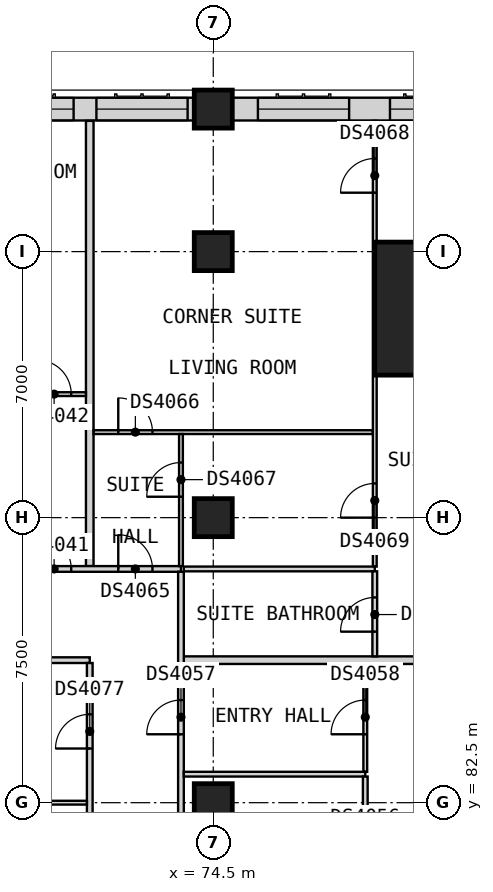
"""IFC4 building model, lengths in metres.
Left out: names, types, materials, properties, quantities, classifications, styles, units other than length and angle.
Written with IfcOpenShell. Run it as: python <this file> out.ifc"""

import sys

from ifc_helpers import new_model, si_unit, direction, frame, frame_2d, origin, origin_2d, place, context, subcontext, project, spatial, rectangle, extrude, element, fill, save


model = new_model("IFC4")
c1 = context("Model", 3, precision=1e-05, world=origin(), true_north=direction((0.0, 1.0)))
c2 = subcontext(c1, "Body", "Model", "MODEL_VIEW")
j1 = project(units=[si_unit("LENGTHUNIT", "METRE"), si_unit("PLANEANGLEUNIT", "RADIAN")], contexts=[c1])
p1 = place(None, origin())
s1 = spatial("IfcSite", under=j1, at=p1, CompositionType="ELEMENT")
p2 = place(p1, origin())
s2 = spatial("IfcBuilding", under=s1, at=p2, CompositionType="ELEMENT")
p3 = place(p2, frame((0.0, 0.0, 141.0)))
s3 = spatial("IfcBuildingStorey", under=s2, at=p3, CompositionType="ELEMENT", Elevation=141.0)
for number, where, z_axis, x_axis in (
    (1, (74.5, 100.75, 0.0), (0.0, 0.0, 1.0), (1.0, 0.0, 0.0)),
    (2, (74.5, 82.5, 0.0), (0.0, 0.0, 1.0), (1.0, 0.0, 0.0)),
    (3, (74.5, 90.0, 0.0), (0.0, 0.0, 1.0), (1.0, 0.0, 0.0)),
    (4, (74.5, 97.0, 0.0), (0.0, 0.0, 1.0), (1.0, 0.0, 0.0)),
):
    element("IfcColumn", number, at=place(p3, frame(where, z_axis=z_axis, x_axis=x_axis)), inside=s3, PredefinedType="COLUMN", context=c2, shape_type="SweptSolid", body=[
        extrude(rectangle(XDim=1.0, YDim=1.0, at=origin_2d()), origin(), (0.0, 0.0, 1.0), 3.6),
    ])
p4 = place(p3, frame((80.5, 95.5, 0.0), z_axis=(0.0, 0.0, 1.0), x_axis=(1.0, 0.0, 0.0)))
e5 = element("IfcColumn", 5, at=p4, inside=s3, PredefinedType="COLUMN", context=c2, shape_type="SweptSolid", body=[
    extrude(rectangle(XDim=3.5, YDim=3.5, at=origin_2d()), origin(), (0.0, 0.0, 1.0), 3.6),
])
p5 = place(p3, frame((82.25, 100.75, 0.0), z_axis=(0.0, 0.0, 1.0), x_axis=(-1.0, 0.0, 0.0)))
e6 = element("IfcWall", 6, at=p5, inside=s3, PredefinedType="SOLIDWALL", context=c2, shape_type="SweptSolid", body=[
    extrude(rectangle(XDim=7.25, YDim=0.6, at=frame_2d((3.625, 0.0))), origin(), (0.0, 0.0, 1.0), 2.85),
])
p6 = place(p5, frame((4.175, 0.0, 0.8)))
e7 = element("IfcOpeningElement", 7, at=p6, cuts=e6, PredefinedType="OPENING", context=c2, shape_type="SweptSolid", body=[
    extrude(rectangle(XDim=2.4, YDim=1.8, at=frame_2d((1.2, 0.9))), frame((0.0, 0.31, 0.0), z_axis=(0.0, -1.0, 0.0), x_axis=(1.0, 0.0, 0.0)), (0.0, 0.0, 1.0), 0.62),
])
p7 = place(p5, frame((1.3, 0.0, 0.8)))
e8 = element("IfcOpeningElement", 8, at=p7, cuts=e6, PredefinedType="OPENING", context=c2, shape_type="SweptSolid", body=[
    extrude(rectangle(XDim=1.8, YDim=1.8, at=frame_2d((0.9, 0.9))), frame((0.0, 0.31, 0.0), z_axis=(0.0, -1.0, 0.0), x_axis=(1.0, 0.0, 0.0)), (0.0, 0.0, 1.0), 0.62),
])
p8 = place(p3, frame((74.0, 100.75, 0.0), z_axis=(0.0, 0.0, 1.0), x_axis=(-1.0, 0.0, 0.0)))
e9 = element("IfcWall", 9, at=p8, inside=s3, PredefinedType="SOLIDWALL", context=c2, shape_type="SweptSolid", body=[
    extrude(rectangle(XDim=6.0, YDim=0.6, at=frame_2d((3.0, 0.0))), origin(), (0.0, 0.0, 1.0), 2.85),
])
p9 = place(p8, frame((3.175, 0.0, 0.8)))
e10 = element("IfcOpeningElement", 10, at=p9, cuts=e9, PredefinedType="OPENING", context=c2, shape_type="SweptSolid", body=[
    extrude(rectangle(XDim=2.4, YDim=1.8, at=frame_2d((1.2, 0.9))), frame((0.0, 0.31, 0.0), z_axis=(0.0, -1.0, 0.0), x_axis=(1.0, 0.0, 0.0)), (0.0, 0.0, 1.0), 0.62),
])
p10 = place(p8, frame((0.175, 0.0, 0.8)))
e11 = element("IfcOpeningElement", 11, at=p10, cuts=e9, PredefinedType="OPENING", context=c2, shape_type="SweptSolid", body=[
    extrude(rectangle(XDim=2.4, YDim=1.8, at=frame_2d((1.2, 0.9))), frame((0.0, 0.31, 0.0), z_axis=(0.0, -1.0, 0.0), x_axis=(1.0, 0.0, 0.0)), (0.0, 0.0, 1.0), 0.62),
])
for number, where, z_axis, x_axis in (
    (12, (73.725, 86.25, 0.0), (0.0, 0.0, 1.0), (1.0, 0.0, 0.0)),
    (13, (71.25, 88.725, 0.0), (0.0, 0.0, 1.0), (0.0, 1.0, 0.0)),
):
    element("IfcWall", number, at=place(p3, frame(where, z_axis=z_axis, x_axis=x_axis)), inside=s3, PredefinedType="PARTITIONING", context=c2, shape_type="SweptSolid", body=[
        extrude(rectangle(XDim=11.715, YDim=0.2, at=frame_2d((5.857, 0.0))), origin(), (0.0, 0.0, 1.0), 3.35),
    ])
p11 = place(p3, frame((33.75, 86.25, 0.0), z_axis=(0.0, 0.0, 1.0), x_axis=(1.0, 0.0, 0.0)))
e14 = element("IfcWall", 14, at=p11, inside=s3, PredefinedType="PARTITIONING", context=c2, shape_type="SweptSolid", body=[
    extrude(rectangle(XDim=37.5, YDim=0.15, at=frame_2d((18.75, 0.0))), origin(), (0.0, 0.0, 1.0), 3.35),
])
p12 = place(p11, frame((12.45, 0.0, 0.0)))
e15 = element("IfcOpeningElement", 15, at=p12, cuts=e14, PredefinedType="OPENING", context=c2, shape_type="SweptSolid", body=[
    extrude(rectangle(XDim=0.9, YDim=2.1, at=frame_2d((0.45, 1.05))), frame((0.0, 0.085, 0.0), z_axis=(0.0, -1.0, 0.0), x_axis=(1.0, 0.0, 0.0)), (0.0, 0.0, 1.0), 0.17),
])
p13 = place(p11, frame((27.225, 0.0, 0.0)))
e16 = element("IfcOpeningElement", 16, at=p13, cuts=e14, PredefinedType="OPENING", context=c2, shape_type="SweptSolid", body=[
    extrude(rectangle(XDim=0.9, YDim=2.1, at=frame_2d((0.45, 1.05))), frame((0.0, 0.085, 0.0), z_axis=(0.0, -1.0, 0.0), x_axis=(1.0, 0.0, 0.0)), (0.0, 0.0, 1.0), 0.17),
])
p14 = place(p3, frame((33.75, 88.65, 0.0), z_axis=(0.0, 0.0, 1.0), x_axis=(1.0, 0.0, 0.0)))
e17 = element("IfcWall", 17, at=p14, inside=s3, PredefinedType="PARTITIONING", context=c2, shape_type="SweptSolid", body=[
    extrude(rectangle(XDim=39.9, YDim=0.15, at=frame_2d((19.95, 0.0))), origin(), (0.0, 0.0, 1.0), 3.35),
])
p15 = place(p14, frame((5.175, 0.0, 0.0)))
e18 = element("IfcOpeningElement", 18, at=p15, cuts=e17, PredefinedType="OPENING", context=c2, shape_type="SweptSolid", body=[
    extrude(rectangle(XDim=0.9, YDim=2.1, at=frame_2d((0.45, 1.05))), frame((0.0, 0.085, 0.0), z_axis=(0.0, -1.0, 0.0), x_axis=(1.0, 0.0, 0.0)), (0.0, 0.0, 1.0), 0.17),
])
p16 = place(p14, frame((9.762, 0.0, 0.0)))
e19 = element("IfcOpeningElement", 19, at=p16, cuts=e17, PredefinedType="OPENING", context=c2, shape_type="SweptSolid", body=[
    extrude(rectangle(XDim=0.9, YDim=2.1, at=frame_2d((0.45, 1.05))), frame((0.0, 0.085, 0.0), z_axis=(0.0, -1.0, 0.0), x_axis=(1.0, 0.0, 0.0)), (0.0, 0.0, 1.0), 0.17),
])
p17 = place(p14, frame((16.938, 0.0, 0.0)))
e20 = element("IfcOpeningElement", 20, at=p17, cuts=e17, PredefinedType="OPENING", context=c2, shape_type="SweptSolid", body=[
    extrude(rectangle(XDim=1.0, YDim=2.1, at=frame_2d((0.5, 1.05))), frame((0.0, 0.085, 0.0), z_axis=(0.0, -1.0, 0.0), x_axis=(1.0, 0.0, 0.0)), (0.0, 0.0, 1.0), 0.17),
])
p18 = place(p14, frame((24.3, 0.0, 0.0)))
e21 = element("IfcOpeningElement", 21, at=p18, cuts=e17, PredefinedType="OPENING", context=c2, shape_type="SweptSolid", body=[
    extrude(rectangle(XDim=0.9, YDim=2.1, at=frame_2d((0.45, 1.05))), frame((0.0, 0.085, 0.0), z_axis=(0.0, -1.0, 0.0), x_axis=(1.0, 0.0, 0.0)), (0.0, 0.0, 1.0), 0.17),
])
p19 = place(p14, frame((36.113, 0.0, 0.0)))
e22 = element("IfcOpeningElement", 22, at=p19, cuts=e17, PredefinedType="OPENING", context=c2, shape_type="SweptSolid", body=[
    extrude(rectangle(XDim=0.9, YDim=2.1, at=frame_2d((0.45, 1.05))), frame((0.0, 0.085, 0.0), z_axis=(0.0, -1.0, 0.0), x_axis=(1.0, 0.0, 0.0)), (0.0, 0.0, 1.0), 0.17),
])
p20 = place(p14, frame((38.25, 0.0, 0.0)))
e23 = element("IfcOpeningElement", 23, at=p20, cuts=e17, PredefinedType="OPENING", context=c2, shape_type="SweptSolid", body=[
    extrude(rectangle(XDim=0.9, YDim=2.1, at=frame_2d((0.45, 1.05))), frame((0.0, 0.085, 0.0), z_axis=(0.0, -1.0, 0.0), x_axis=(1.0, 0.0, 0.0)), (0.0, 0.0, 1.0), 0.17),
])
p21 = place(p3, frame((71.25, 78.075, 0.0), z_axis=(0.0, 0.0, 1.0), x_axis=(0.0, 1.0, 0.0)))
e24 = element("IfcWall", 24, at=p21, inside=s3, PredefinedType="PARTITIONING", context=c2, shape_type="SweptSolid", body=[
    extrude(rectangle(XDim=8.1, YDim=0.15, at=frame_2d((4.05, 0.0))), origin(), (0.0, 0.0, 1.0), 3.35),
])
p22 = place(p21, frame((5.85, 0.0, 0.0)))
e25 = element("IfcOpeningElement", 25, at=p22, cuts=e24, PredefinedType="OPENING", context=c2, shape_type="SweptSolid", body=[
    extrude(rectangle(XDim=0.9, YDim=2.1, at=frame_2d((0.45, 1.05))), frame((0.0, 0.085, 0.0), z_axis=(0.0, -1.0, 0.0), x_axis=(1.0, 0.0, 0.0)), (0.0, 0.0, 1.0), 0.17),
])
p23 = place(p21, frame((1.725, 0.0, 0.0)))
e26 = element("IfcOpeningElement", 26, at=p23, cuts=e24, PredefinedType="OPENING", context=c2, shape_type="SweptSolid", body=[
    extrude(rectangle(XDim=0.9, YDim=2.1, at=frame_2d((0.45, 1.05))), frame((0.0, 0.085, 0.0), z_axis=(0.0, -1.0, 0.0), x_axis=(1.0, 0.0, 0.0)), (0.0, 0.0, 1.0), 0.17),
])
p24 = place(p3, frame((73.65, 50.175, 0.0), z_axis=(0.0, 0.0, 1.0), x_axis=(0.0, 1.0, 0.0)))
e27 = element("IfcWall", 27, at=p24, inside=s3, PredefinedType="PARTITIONING", context=c2, shape_type="SweptSolid", body=[
    extrude(rectangle(XDim=38.4, YDim=0.15, at=frame_2d((19.2, 0.0))), origin(), (0.0, 0.0, 1.0), 3.35),
])
p25 = place(p24, frame((7.875, 0.0, 0.0)))
e28 = element("IfcOpeningElement", 28, at=p25, cuts=e27, PredefinedType="OPENING", context=c2, shape_type="SweptSolid", body=[
    extrude(rectangle(XDim=0.9, YDim=2.1, at=frame_2d((0.45, 1.05))), frame((0.0, 0.085, 0.0), z_axis=(0.0, -1.0, 0.0), x_axis=(1.0, 0.0, 0.0)), (0.0, 0.0, 1.0), 0.17),
])
p26 = place(p24, frame((23.012, 0.0, 0.0)))
e29 = element("IfcOpeningElement", 29, at=p26, cuts=e27, PredefinedType="OPENING", context=c2, shape_type="SweptSolid", body=[
    extrude(rectangle(XDim=1.0, YDim=2.1, at=frame_2d((0.5, 1.05))), frame((0.0, 0.085, 0.0), z_axis=(0.0, -1.0, 0.0), x_axis=(1.0, 0.0, 0.0)), (0.0, 0.0, 1.0), 0.17),
])
p27 = place(p24, frame((27.188, 0.0, 0.0)))
e30 = element("IfcOpeningElement", 30, at=p27, cuts=e27, PredefinedType="OPENING", context=c2, shape_type="SweptSolid", body=[
    extrude(rectangle(XDim=0.9, YDim=2.1, at=frame_2d((0.45, 1.05))), frame((0.0, 0.085, 0.0), z_axis=(0.0, -1.0, 0.0), x_axis=(1.0, 0.0, 0.0)), (0.0, 0.0, 1.0), 0.17),
])
p28 = place(p24, frame((34.125, 0.0, 0.0)))
e31 = element("IfcOpeningElement", 31, at=p28, cuts=e27, PredefinedType="OPENING", context=c2, shape_type="SweptSolid", body=[
    extrude(rectangle(XDim=0.9, YDim=2.1, at=frame_2d((0.45, 1.05))), frame((0.0, 0.085, 0.0), z_axis=(0.0, -1.0, 0.0), x_axis=(1.0, 0.0, 0.0)), (0.0, 0.0, 1.0), 0.17),
])
p29 = place(p3, frame((60.0, 82.5, 0.0), z_axis=(0.0, 0.0, 1.0), x_axis=(1.0, 0.0, 0.0)))
e32 = element("IfcWall", 32, at=p29, inside=s3, PredefinedType="PARTITIONING", context=c2, shape_type="SweptSolid", body=[
    extrude(rectangle(XDim=11.175, YDim=0.1, at=frame_2d((5.587, 0.0))), origin(), (0.0, 0.0, 1.0), 3.35),
])
p30 = place(p3, frame((71.35, 92.25, 0.0), z_axis=(0.0, 0.0, 1.0), x_axis=(1.0, 0.0, 0.0)))
e33 = element("IfcWall", 33, at=p30, inside=s3, PredefinedType="PARTITIONING", context=c2, shape_type="SweptSolid", body=[
    extrude(rectangle(XDim=7.35, YDim=0.1, at=frame_2d((3.675, 0.0))), origin(), (0.0, 0.0, 1.0), 3.35),
])
p31 = place(p30, frame((0.65, 0.0, 0.0)))
e34 = element("IfcOpeningElement", 34, at=p31, cuts=e33, PredefinedType="OPENING", context=c2, shape_type="SweptSolid", body=[
    extrude(rectangle(XDim=0.9, YDim=2.1, at=frame_2d((0.45, 1.05))), frame((0.0, 0.06, 0.0), z_axis=(0.0, -1.0, 0.0), x_axis=(1.0, 0.0, 0.0)), (0.0, 0.0, 1.0), 0.12),
])
p32 = place(p3, frame((69.438, 93.25, 0.0), z_axis=(0.0, 0.0, 1.0), x_axis=(1.0, 0.0, 0.0)))
e35 = element("IfcWall", 35, at=p32, inside=s3, PredefinedType="PARTITIONING", context=c2, shape_type="SweptSolid", body=[
    extrude(rectangle(XDim=1.712, YDim=0.1, at=frame_2d((0.856, 0.0))), origin(), (0.0, 0.0, 1.0), 3.35),
])
p33 = place(p32, frame((0.425, 0.0, 0.0)))
e36 = element("IfcOpeningElement", 36, at=p33, cuts=e35, PredefinedType="OPENING", context=c2, shape_type="SweptSolid", body=[
    extrude(rectangle(XDim=0.9, YDim=2.1, at=frame_2d((0.45, 1.05))), frame((0.0, 0.06, 0.0), z_axis=(0.0, -1.0, 0.0), x_axis=(1.0, 0.0, 0.0)), (0.0, 0.0, 1.0), 0.12),
])
p34 = place(p3, frame((78.8, 96.75, 0.0), z_axis=(0.0, 0.0, 1.0), x_axis=(1.0, 0.0, 0.0)))
e37 = element("IfcWall", 37, at=p34, inside=s3, PredefinedType="PARTITIONING", context=c2, shape_type="SweptSolid", body=[
    extrude(rectangle(XDim=3.44, YDim=0.1, at=frame_2d((1.72, 0.0))), origin(), (0.0, 0.0, 1.0), 3.35),
])
p35 = place(p3, frame((73.65, 88.725, 0.0), z_axis=(0.0, 0.0, 1.0), x_axis=(0.0, 1.0, 0.0)))
e38 = element("IfcWall", 38, at=p35, inside=s3, PredefinedType="PARTITIONING", context=c2, shape_type="SweptSolid", body=[
    extrude(rectangle(XDim=3.475, YDim=0.1, at=frame_2d((1.737, 0.0))), origin(), (0.0, 0.0, 1.0), 3.35),
])
p36 = place(p35, frame((1.825, 0.0, 0.0)))
e39 = element("IfcOpeningElement", 39, at=p36, cuts=e38, PredefinedType="OPENING", context=c2, shape_type="SweptSolid", body=[
    extrude(rectangle(XDim=0.9, YDim=2.1, at=frame_2d((0.45, 1.05))), frame((0.0, 0.06, 0.0), z_axis=(0.0, -1.0, 0.0), x_axis=(1.0, 0.0, 0.0)), (0.0, 0.0, 1.0), 0.12),
])
p37 = place(p3, frame((78.5, 83.312, 0.0), z_axis=(0.0, 0.0, 1.0), x_axis=(0.0, 1.0, 0.0)))
e40 = element("IfcWall", 40, at=p37, inside=s3, PredefinedType="PARTITIONING", context=c2, shape_type="SweptSolid", body=[
    extrude(rectangle(XDim=2.837, YDim=0.1, at=frame_2d((1.419, 0.0))), origin(), (0.0, 0.0, 1.0), 3.35),
])
p38 = place(p37, frame((0.988, 0.0, 0.0)))
e41 = element("IfcOpeningElement", 41, at=p38, cuts=e40, PredefinedType="OPENING", context=c2, shape_type="SweptSolid", body=[
    extrude(rectangle(XDim=0.9, YDim=2.1, at=frame_2d((0.45, 1.05))), frame((0.0, 0.06, 0.0), z_axis=(0.0, -1.0, 0.0), x_axis=(1.0, 0.0, 0.0)), (0.0, 0.0, 1.0), 0.12),
])
p39 = place(p3, frame((78.75, 88.712, 0.0), z_axis=(0.0, 0.0, 1.0), x_axis=(0.0, 1.0, 0.0)))
e42 = element("IfcWall", 42, at=p39, inside=s3, PredefinedType="PARTITIONING", context=c2, shape_type="SweptSolid", body=[
    extrude(rectangle(XDim=11.728, YDim=0.1, at=frame_2d((5.864, 0.0))), origin(), (0.0, 0.0, 1.0), 3.35),
])
p40 = place(p39, frame((9.837, 0.0, 0.0)))
e43 = element("IfcOpeningElement", 43, at=p40, cuts=e42, PredefinedType="OPENING", context=c2, shape_type="SweptSolid", body=[
    extrude(rectangle(XDim=0.9, YDim=2.1, at=frame_2d((0.45, 1.05))), frame((0.0, 0.06, 0.0), z_axis=(0.0, -1.0, 0.0), x_axis=(1.0, 0.0, 0.0)), (0.0, 0.0, 1.0), 0.12),
])
p41 = place(p39, frame((1.288, 0.0, 0.0)))
e44 = element("IfcOpeningElement", 44, at=p41, cuts=e42, PredefinedType="OPENING", context=c2, shape_type="SweptSolid", body=[
    extrude(rectangle(XDim=0.9, YDim=2.1, at=frame_2d((0.45, 1.05))), frame((0.0, 0.06, 0.0), z_axis=(0.0, -1.0, 0.0), x_axis=(1.0, 0.0, 0.0)), (0.0, 0.0, 1.0), 0.12),
])
p42 = place(p3, frame((73.725, 83.25, 0.0), z_axis=(0.0, 0.0, 1.0), x_axis=(1.0, 0.0, 0.0)))
e45 = element("IfcWall", 45, at=p42, inside=s3, PredefinedType="PARTITIONING", context=c2, shape_type="SweptSolid", body=[
    extrude(rectangle(XDim=4.775, YDim=0.125, at=frame_2d((2.387, 0.0))), origin(), (0.0, 0.0, 1.0), 3.35),
])
p43 = place(p3, frame((73.725, 88.65, 0.0), z_axis=(0.0, 0.0, 1.0), x_axis=(1.0, 0.0, 0.0)))
e46 = element("IfcWall", 46, at=p43, inside=s3, PredefinedType="PARTITIONING", context=c2, shape_type="SweptSolid", body=[
    extrude(rectangle(XDim=5.025, YDim=0.125, at=frame_2d((2.512, 0.0))), origin(), (0.0, 0.0, 1.0), 3.35),
])
p44 = place(p3, frame((78.5, 78.85, 0.0), z_axis=(0.0, 0.0, 1.0), x_axis=(0.0, 1.0, 0.0)))
e47 = element("IfcWall", 47, at=p44, inside=s3, PredefinedType="PARTITIONING", context=c2, shape_type="SweptSolid", body=[
    extrude(rectangle(XDim=4.337, YDim=0.125, at=frame_2d((2.169, 0.0))), origin(), (0.0, 0.0, 1.0), 3.35),
])
p45 = place(p44, frame((1.7, 0.0, 0.0)))
e48 = element("IfcOpeningElement", 48, at=p45, cuts=e47, PredefinedType="OPENING", context=c2, shape_type="SweptSolid", body=[
    extrude(rectangle(XDim=0.9, YDim=2.1, at=frame_2d((0.45, 1.05))), frame((0.0, 0.073, 0.0), z_axis=(0.0, -1.0, 0.0), x_axis=(1.0, 0.0, 0.0)), (0.0, 0.0, 1.0), 0.145),
])
p46 = place(p3, frame((78.75, 86.35, 0.0), z_axis=(0.0, 0.0, 1.0), x_axis=(0.0, 1.0, 0.0)))
e49 = element("IfcWall", 49, at=p46, inside=s3, PredefinedType="PARTITIONING", context=c2, shape_type="SweptSolid", body=[
    extrude(rectangle(XDim=2.237, YDim=0.125, at=frame_2d((1.119, 0.0))), origin(), (0.0, 0.0, 1.0), 3.35),
])
p47 = place(p46, frame((0.65, 0.0, 0.0)))
e50 = element("IfcOpeningElement", 50, at=p47, cuts=e49, PredefinedType="OPENING", context=c2, shape_type="SweptSolid", body=[
    extrude(rectangle(XDim=0.9, YDim=2.1, at=frame_2d((0.45, 1.05))), frame((0.0, 0.073, 0.0), z_axis=(0.0, -1.0, 0.0), x_axis=(1.0, 0.0, 0.0)), (0.0, 0.0, 1.0), 0.145),
])
p48 = place(p6, origin())
e51 = element("IfcWindow", 51, at=p48, inside=s3, PartitioningType="SINGLE_PANEL", PredefinedType="WINDOW", context=c2, shape_type="SweptSolid", body=[
    extrude(rectangle(XDim=2.4, YDim=1.8, at=frame_2d((1.2, 0.9))), frame((0.0, -0.07, 0.0), z_axis=(0.0, -1.0, 0.0), x_axis=(1.0, 0.0, 0.0)), (0.0, 0.0, 1.0), 0.06),
])
fill(e7, e51)
p49 = place(p7, origin())
e52 = element("IfcWindow", 52, at=p49, inside=s3, PartitioningType="SINGLE_PANEL", PredefinedType="WINDOW", context=c2, shape_type="SweptSolid", body=[
    extrude(rectangle(XDim=1.8, YDim=1.8, at=frame_2d((0.9, 0.9))), frame((0.0, -0.07, 0.0), z_axis=(0.0, -1.0, 0.0), x_axis=(1.0, 0.0, 0.0)), (0.0, 0.0, 1.0), 0.06),
])
fill(e8, e52)
p50 = place(p9, origin())
e53 = element("IfcWindow", 53, at=p50, inside=s3, PartitioningType="SINGLE_PANEL", PredefinedType="WINDOW", context=c2, shape_type="SweptSolid", body=[
    extrude(rectangle(XDim=2.4, YDim=1.8, at=frame_2d((1.2, 0.9))), frame((0.0, -0.07, 0.0), z_axis=(0.0, -1.0, 0.0), x_axis=(1.0, 0.0, 0.0)), (0.0, 0.0, 1.0), 0.06),
])
fill(e10, e53)
p51 = place(p10, origin())
e54 = element("IfcWindow", 54, at=p51, inside=s3, PartitioningType="SINGLE_PANEL", PredefinedType="WINDOW", context=c2, shape_type="SweptSolid", body=[
    extrude(rectangle(XDim=2.4, YDim=1.8, at=frame_2d((1.2, 0.9))), frame((0.0, -0.07, 0.0), z_axis=(0.0, -1.0, 0.0), x_axis=(1.0, 0.0, 0.0)), (0.0, 0.0, 1.0), 0.06),
])
fill(e11, e54)
p52 = place(p19, origin())
e55 = element("IfcDoor", 55, at=p52, inside=s3, OperationType="SINGLE_SWING_LEFT", PredefinedType="DOOR", context=c2, shape_type="SweptSolid", body=[
    extrude(rectangle(XDim=0.9, YDim=2.1, at=frame_2d((0.45, 1.05))), frame((0.0, 0.025, 0.0), z_axis=(0.0, -1.0, 0.0), x_axis=(1.0, 0.0, 0.0)), (0.0, 0.0, 1.0), 0.05),
])
fill(e22, e55)
p53 = place(p33, origin())
e56 = element("IfcDoor", 56, at=p53, inside=s3, OperationType="SINGLE_SWING_RIGHT", PredefinedType="DOOR", context=c2, shape_type="SweptSolid", body=[
    extrude(rectangle(XDim=0.9, YDim=2.1, at=frame_2d((0.45, 1.05))), frame((0.0, 0.025, 0.0), z_axis=(0.0, -1.0, 0.0), x_axis=(1.0, 0.0, 0.0)), (0.0, 0.0, 1.0), 0.05),
])
fill(e36, e56)
p54 = place(p28, origin())
e57 = element("IfcDoor", 57, at=p54, inside=s3, OperationType="SINGLE_SWING_RIGHT", PredefinedType="DOOR", context=c2, shape_type="SweptSolid", body=[
    extrude(rectangle(XDim=0.9, YDim=2.1, at=frame_2d((0.45, 1.05))), frame((0.0, 0.025, 0.0), z_axis=(0.0, -1.0, 0.0), x_axis=(1.0, 0.0, 0.0)), (0.0, 0.0, 1.0), 0.05),
])
fill(e31, e57)
p55 = place(p38, origin())
e58 = element("IfcDoor", 58, at=p55, inside=s3, OperationType="SINGLE_SWING_LEFT", PredefinedType="DOOR", context=c2, shape_type="SweptSolid", body=[
    extrude(rectangle(XDim=0.9, YDim=2.1, at=frame_2d((0.45, 1.05))), frame((0.0, 0.025, 0.0), z_axis=(0.0, -1.0, 0.0), x_axis=(1.0, 0.0, 0.0)), (0.0, 0.0, 1.0), 0.05),
])
fill(e41, e58)
p56 = place(p20, origin())
e59 = element("IfcDoor", 59, at=p56, inside=s3, OperationType="SINGLE_SWING_RIGHT", PredefinedType="DOOR", context=c2, shape_type="SweptSolid", body=[
    extrude(rectangle(XDim=0.9, YDim=2.1, at=frame_2d((0.45, 1.05))), frame((0.0, 0.025, 0.0), z_axis=(0.0, -1.0, 0.0), x_axis=(1.0, 0.0, 0.0)), (0.0, 0.0, 1.0), 0.05),
])
fill(e23, e59)
p57 = place(p31, origin())
e60 = element("IfcDoor", 60, at=p57, inside=s3, OperationType="SINGLE_SWING_LEFT", PredefinedType="DOOR", context=c2, shape_type="SweptSolid", body=[
    extrude(rectangle(XDim=0.9, YDim=2.1, at=frame_2d((0.45, 1.05))), frame((0.0, 0.025, 0.0), z_axis=(0.0, -1.0, 0.0), x_axis=(1.0, 0.0, 0.0)), (0.0, 0.0, 1.0), 0.05),
])
fill(e34, e60)
p58 = place(p36, origin())
e61 = element("IfcDoor", 61, at=p58, inside=s3, OperationType="SINGLE_SWING_RIGHT", PredefinedType="DOOR", context=c2, shape_type="SweptSolid", body=[
    extrude(rectangle(XDim=0.9, YDim=2.1, at=frame_2d((0.45, 1.05))), frame((0.0, 0.025, 0.0), z_axis=(0.0, -1.0, 0.0), x_axis=(1.0, 0.0, 0.0)), (0.0, 0.0, 1.0), 0.05),
])
fill(e39, e61)
p59 = place(p40, origin())
e62 = element("IfcDoor", 62, at=p59, inside=s3, OperationType="SINGLE_SWING_LEFT", PredefinedType="DOOR", context=c2, shape_type="SweptSolid", body=[
    extrude(rectangle(XDim=0.9, YDim=2.1, at=frame_2d((0.45, 1.05))), frame((0.0, 0.025, 0.0), z_axis=(0.0, -1.0, 0.0), x_axis=(1.0, 0.0, 0.0)), (0.0, 0.0, 1.0), 0.05),
])
fill(e43, e62)
p60 = place(p41, origin())
e63 = element("IfcDoor", 63, at=p60, inside=s3, OperationType="SINGLE_SWING_RIGHT", PredefinedType="DOOR", context=c2, shape_type="SweptSolid", body=[
    extrude(rectangle(XDim=0.9, YDim=2.1, at=frame_2d((0.45, 1.05))), frame((0.0, 0.025, 0.0), z_axis=(0.0, -1.0, 0.0), x_axis=(1.0, 0.0, 0.0)), (0.0, 0.0, 1.0), 0.05),
])
fill(e44, e63)
p61 = place(p47, origin())
e64 = element("IfcDoor", 64, at=p61, inside=s3, OperationType="SINGLE_SWING_LEFT", PredefinedType="DOOR", context=c2, shape_type="SweptSolid", body=[
    extrude(rectangle(XDim=0.9, YDim=2.1, at=frame_2d((0.45, 1.05))), frame((0.0, 0.025, 0.0), z_axis=(0.0, -1.0, 0.0), x_axis=(1.0, 0.0, 0.0)), (0.0, 0.0, 1.0), 0.05),
])
fill(e50, e64)
p62 = place(p22, origin())
e65 = element("IfcDoor", 65, at=p62, inside=s3, OperationType="SINGLE_SWING_LEFT", PredefinedType="DOOR", context=c2, shape_type="SweptSolid", body=[
    extrude(rectangle(XDim=0.9, YDim=2.1, at=frame_2d((0.45, 1.05))), frame((0.0, 0.025, 0.0), z_axis=(0.0, -1.0, 0.0), x_axis=(1.0, 0.0, 0.0)), (0.0, 0.0, 1.0), 0.05),
])
fill(e25, e65)
save(model, sys.argv[1])
